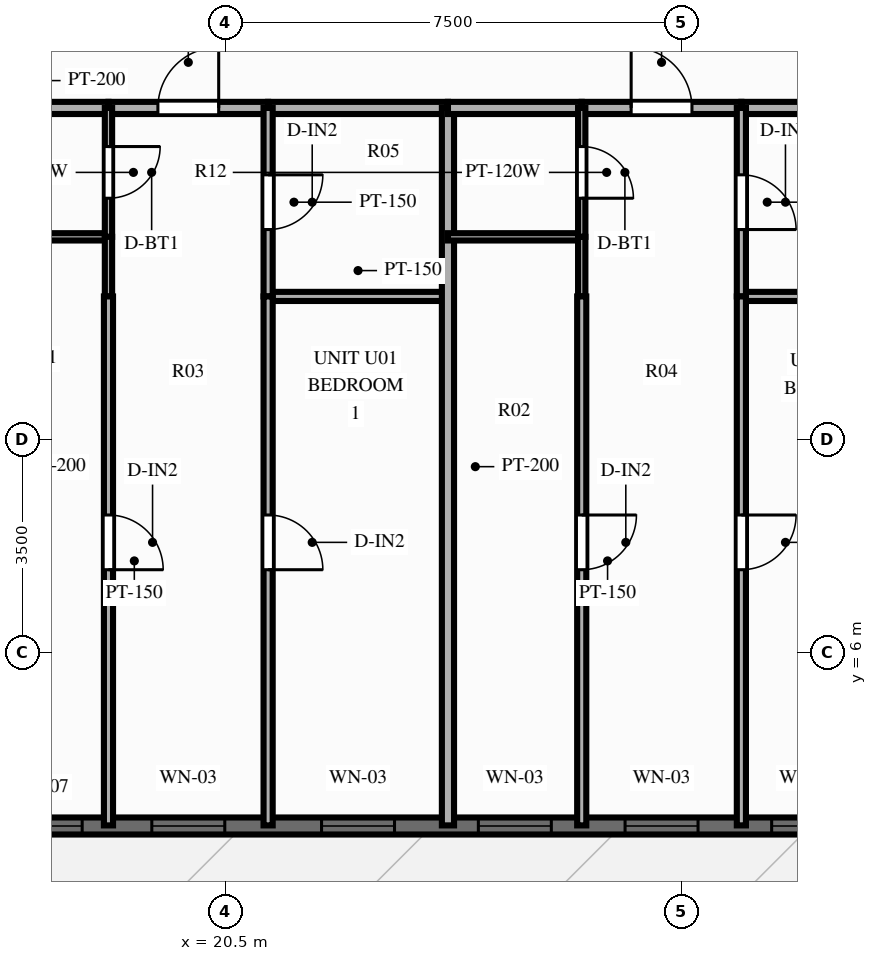
"""IFC4 building model, lengths in metres.
Left out: names, types, materials, properties, quantities, classifications, styles, units other than length and angle.
Written with IfcOpenShell. Run it as: python <this file> out.ifc"""

import sys

from ifc_helpers import new_model, si_unit, direction, frame, frame_2d, origin, place, context, subcontext, project, spatial, rectangle, extrude, source, transform, mapped, element, fill, save


model = new_model("IFC4")
c1 = context("Model", 3, precision=1e-05, world=origin(), true_north=direction((0.0, 1.0)))
c2 = subcontext(c1, "Body", "Model", "MODEL_VIEW")
j1 = project(units=[si_unit("LENGTHUNIT", "METRE"), si_unit("PLANEANGLEUNIT", "RADIAN")], contexts=[c1])
p1 = place(None, origin())
s1 = spatial("IfcSite", under=j1, at=p1, CompositionType="ELEMENT")
p2 = place(p1, origin())
s2 = spatial("IfcBuilding", under=s1, at=p2, CompositionType="ELEMENT")
p3 = place(p2, frame((0.0, 0.0, 77.85)))
s3 = spatial("IfcBuildingStorey", under=s2, at=p3, CompositionType="ELEMENT", Elevation=77.85)
p4 = place(p3, frame((16.2, 3.14, 0.0), z_axis=(0.0, 0.0, 1.0), x_axis=(1.0, 0.0, 0.0)))
e1 = element("IfcWall", 1, at=p4, inside=s3, PredefinedType="SOLIDWALL", context=c2, shape_type="SweptSolid", body=[
    extrude(rectangle(XDim=43.6, YDim=0.28, at=frame_2d((21.8, 0.0))), origin(), (0.0, 0.0, 1.0), 2.28),
])
p5 = place(p4, frame((0.748, 0.0, 0.25)))
e2 = element("IfcOpeningElement", 2, at=p5, cuts=e1, PredefinedType="OPENING", context=c2, shape_type="SweptSolid", body=[
    extrude(rectangle(XDim=1.2, YDim=1.5, at=frame_2d((0.6, 0.75))), frame((0.0, 0.152, 0.0), z_axis=(0.0, -1.0, 0.0), x_axis=(1.0, 0.0, 0.0)), (0.0, 0.0, 1.0), 0.304),
])
p6 = place(p4, frame((3.093, 0.0, 0.25)))
e3 = element("IfcOpeningElement", 3, at=p6, cuts=e1, PredefinedType="OPENING", context=c2, shape_type="SweptSolid", body=[
    extrude(rectangle(XDim=1.2, YDim=1.5, at=frame_2d((0.6, 0.75))), frame((0.0, 0.152, 0.0), z_axis=(0.0, -1.0, 0.0), x_axis=(1.0, 0.0, 0.0)), (0.0, 0.0, 1.0), 0.304),
])
p7 = place(p4, frame((5.885, 0.0, 0.25)))
e4 = element("IfcOpeningElement", 4, at=p7, cuts=e1, PredefinedType="OPENING", context=c2, shape_type="SweptSolid", body=[
    extrude(rectangle(XDim=1.2, YDim=1.5, at=frame_2d((0.6, 0.75))), frame((0.0, 0.152, 0.0), z_axis=(0.0, -1.0, 0.0), x_axis=(1.0, 0.0, 0.0)), (0.0, 0.0, 1.0), 0.304),
])
p8 = place(p4, frame((8.463, 0.0, 0.25)))
e5 = element("IfcOpeningElement", 5, at=p8, cuts=e1, PredefinedType="OPENING", context=c2, shape_type="SweptSolid", body=[
    extrude(rectangle(XDim=1.2, YDim=1.5, at=frame_2d((0.6, 0.75))), frame((0.0, 0.152, 0.0), z_axis=(0.0, -1.0, 0.0), x_axis=(1.0, 0.0, 0.0)), (0.0, 0.0, 1.0), 0.304),
])
p9 = place(p4, frame((10.876, 0.0, 0.25)))
e6 = element("IfcOpeningElement", 6, at=p9, cuts=e1, PredefinedType="OPENING", context=c2, shape_type="SweptSolid", body=[
    extrude(rectangle(XDim=1.2, YDim=1.5, at=frame_2d((0.6, 0.75))), frame((0.0, 0.152, 0.0), z_axis=(0.0, -1.0, 0.0), x_axis=(1.0, 0.0, 0.0)), (0.0, 0.0, 1.0), 0.304),
])
p10 = place(p4, frame((13.287, 0.0, 0.25)))
e7 = element("IfcOpeningElement", 7, at=p10, cuts=e1, PredefinedType="OPENING", context=c2, shape_type="SweptSolid", body=[
    extrude(rectangle(XDim=1.2, YDim=1.5, at=frame_2d((0.6, 0.75))), frame((0.0, 0.152, 0.0), z_axis=(0.0, -1.0, 0.0), x_axis=(1.0, 0.0, 0.0)), (0.0, 0.0, 1.0), 0.304),
])
p11 = place(p4, frame((16.521, 0.0, 0.25)))
e8 = element("IfcOpeningElement", 8, at=p11, cuts=e1, PredefinedType="OPENING", context=c2, shape_type="SweptSolid", body=[
    extrude(rectangle(XDim=1.2, YDim=1.5, at=frame_2d((0.6, 0.75))), frame((0.0, 0.152, 0.0), z_axis=(0.0, -1.0, 0.0), x_axis=(1.0, 0.0, 0.0)), (0.0, 0.0, 1.0), 0.304),
])
p12 = place(p4, frame((22.938, 0.0, 0.0), z_axis=(0.0, 0.0, 1.0), x_axis=(-1.0, 0.0, 0.0)))
e9 = element("IfcOpeningElement", 9, at=p12, cuts=e1, PredefinedType="OPENING", context=c2, shape_type="SweptSolid", body=[
    extrude(rectangle(XDim=1.1, YDim=2.15, at=frame_2d((0.55, 1.075))), frame((0.0, 0.152, 0.0), z_axis=(0.0, -1.0, 0.0), x_axis=(1.0, 0.0, 0.0)), (0.0, 0.0, 1.0), 0.304),
])
p13 = place(p4, frame((26.657, 0.0, 0.25)))
e10 = element("IfcOpeningElement", 10, at=p13, cuts=e1, PredefinedType="OPENING", context=c2, shape_type="SweptSolid", body=[
    extrude(rectangle(XDim=0.95, YDim=1.5, at=frame_2d((0.475, 0.75))), frame((0.0, 0.152, 0.0), z_axis=(0.0, -1.0, 0.0), x_axis=(1.0, 0.0, 0.0)), (0.0, 0.0, 1.0), 0.304),
])
p14 = place(p4, frame((28.965, 0.0, 0.25)))
e11 = element("IfcOpeningElement", 11, at=p14, cuts=e1, PredefinedType="OPENING", context=c2, shape_type="SweptSolid", body=[
    extrude(rectangle(XDim=0.7, YDim=1.5, at=frame_2d((0.35, 0.75))), frame((0.0, 0.152, 0.0), z_axis=(0.0, -1.0, 0.0), x_axis=(1.0, 0.0, 0.0)), (0.0, 0.0, 1.0), 0.304),
])
p15 = place(p4, frame((31.158, 0.0, 0.25)))
e12 = element("IfcOpeningElement", 12, at=p15, cuts=e1, PredefinedType="OPENING", context=c2, shape_type="SweptSolid", body=[
    extrude(rectangle(XDim=1.2, YDim=1.5, at=frame_2d((0.6, 0.75))), frame((0.0, 0.152, 0.0), z_axis=(0.0, -1.0, 0.0), x_axis=(1.0, 0.0, 0.0)), (0.0, 0.0, 1.0), 0.304),
])
p16 = place(p4, frame((35.992, 0.0, 0.25)))
e13 = element("IfcOpeningElement", 13, at=p16, cuts=e1, PredefinedType="OPENING", context=c2, shape_type="SweptSolid", body=[
    extrude(rectangle(XDim=1.2, YDim=1.5, at=frame_2d((0.6, 0.75))), frame((0.0, 0.152, 0.0), z_axis=(0.0, -1.0, 0.0), x_axis=(1.0, 0.0, 0.0)), (0.0, 0.0, 1.0), 0.304),
])
p17 = place(p4, frame((40.885, 0.0, 0.25)))
e14 = element("IfcOpeningElement", 14, at=p17, cuts=e1, PredefinedType="OPENING", context=c2, shape_type="SweptSolid", body=[
    extrude(rectangle(XDim=1.2, YDim=1.5, at=frame_2d((0.6, 0.75))), frame((0.0, 0.152, 0.0), z_axis=(0.0, -1.0, 0.0), x_axis=(1.0, 0.0, 0.0)), (0.0, 0.0, 1.0), 0.304),
])
p18 = place(p3, frame((16.38, 14.95, 0.0), z_axis=(0.0, 0.0, 1.0), x_axis=(1.0, 0.0, 0.0)))
e15 = element("IfcWall", 15, at=p18, inside=s3, PredefinedType="PARTITIONING", context=c2, shape_type="SweptSolid", body=[
    extrude(rectangle(XDim=2.2, YDim=0.2, at=frame_2d((1.1, 0.0))), origin(), (0.0, 0.0, 1.0), 2.79),
])
p19 = place(p3, frame((18.58, 14.95, 0.0), z_axis=(0.0, 0.0, 1.0), x_axis=(1.0, 0.0, 0.0)))
e16 = element("IfcWall", 16, at=p19, inside=s3, PredefinedType="PARTITIONING", context=c2, shape_type="SweptSolid", body=[
    extrude(rectangle(XDim=2.625, YDim=0.2, at=frame_2d((1.313, 0.0))), origin(), (0.0, 0.0, 1.0), 2.79),
])
p20 = place(p19, frame((0.813, 0.0, 0.0)))
e17 = element("IfcOpeningElement", 17, at=p20, cuts=e16, PredefinedType="OPENING", context=c2, shape_type="SweptSolid", body=[
    extrude(rectangle(XDim=1.0, YDim=2.15, at=frame_2d((0.5, 1.075))), frame((0.0, 0.112, 0.0), z_axis=(0.0, -1.0, 0.0), x_axis=(1.0, 0.0, 0.0)), (0.0, 0.0, 1.0), 0.224),
])
p21 = place(p3, frame((21.206, 14.95, 0.0), z_axis=(0.0, 0.0, 1.0), x_axis=(1.0, 0.0, 0.0)))
e18 = element("IfcWall", 18, at=p21, inside=s3, PredefinedType="PARTITIONING", context=c2, shape_type="SweptSolid", body=[
    extrude(rectangle(XDim=2.958, YDim=0.2, at=frame_2d((1.479, 0.0))), origin(), (0.0, 0.0, 1.0), 2.79),
])
p22 = place(p3, frame((16.38, 12.83, 0.0), z_axis=(0.0, 0.0, 1.0), x_axis=(1.0, 0.0, 0.0)))
e19 = element("IfcWall", 19, at=p22, inside=s3, PredefinedType="PARTITIONING", context=c2, shape_type="SweptSolid", body=[
    extrude(rectangle(XDim=2.2, YDim=0.12, at=frame_2d((1.1, 0.0))), origin(), (0.0, 0.0, 1.0), 2.79),
])
p23 = place(p3, frame((21.206, 11.85, 0.0), z_axis=(0.0, 0.0, 1.0), x_axis=(1.0, 0.0, 0.0)))
e20 = element("IfcWall", 20, at=p23, inside=s3, PredefinedType="PARTITIONING", context=c2, shape_type="SweptSolid", body=[
    extrude(rectangle(XDim=2.958, YDim=0.15, at=frame_2d((1.479, 0.0))), origin(), (0.0, 0.0, 1.0), 2.79),
])
p24 = place(p3, frame((18.58, 14.95, 0.0), z_axis=(0.0, 0.0, 1.0), x_axis=(0.0, -1.0, 0.0)))
e21 = element("IfcWall", 21, at=p24, inside=s3, PredefinedType="PARTITIONING", context=c2, shape_type="SweptSolid", body=[
    extrude(rectangle(XDim=2.12, YDim=0.12, at=frame_2d((1.06, 0.0))), origin(), (0.0, 0.0, 1.0), 2.79),
])
p25 = place(p24, frame((0.635, 0.0, 0.0)))
e22 = element("IfcOpeningElement", 22, at=p25, cuts=e21, PredefinedType="OPENING", context=c2, shape_type="SweptSolid", body=[
    extrude(rectangle(XDim=0.85, YDim=2.05, at=frame_2d((0.425, 1.025))), frame((0.0, 0.072, 0.0), z_axis=(0.0, -1.0, 0.0), x_axis=(1.0, 0.0, 0.0)), (0.0, 0.0, 1.0), 0.144),
])
p26 = place(p3, frame((18.58, 12.83, 0.0), z_axis=(0.0, 0.0, 1.0), x_axis=(0.0, -1.0, 0.0)))
e23 = element("IfcWall", 23, at=p26, inside=s3, PredefinedType="PARTITIONING", context=c2, shape_type="SweptSolid", body=[
    extrude(rectangle(XDim=0.98, YDim=0.12, at=frame_2d((0.49, 0.0))), origin(), (0.0, 0.0, 1.0), 2.79),
])
p27 = place(p3, frame((18.58, 11.85, 0.0), z_axis=(0.0, 0.0, 1.0), x_axis=(0.0, -1.0, 0.0)))
e24 = element("IfcWall", 24, at=p27, inside=s3, PredefinedType="PARTITIONING", context=c2, shape_type="SweptSolid", body=[
    extrude(rectangle(XDim=8.7, YDim=0.15, at=frame_2d((4.35, 0.0))), origin(), (0.0, 0.0, 1.0), 2.79),
])
p28 = place(p27, frame((3.595, 0.0, 0.0)))
e25 = element("IfcOpeningElement", 25, at=p28, cuts=e24, PredefinedType="OPENING", context=c2, shape_type="SweptSolid", body=[
    extrude(rectangle(XDim=0.9, YDim=2.1, at=frame_2d((0.45, 1.05))), frame((0.0, 0.087, 0.0), z_axis=(0.0, -1.0, 0.0), x_axis=(1.0, 0.0, 0.0)), (0.0, 0.0, 1.0), 0.174),
])
p29 = place(p3, frame((21.206, 14.95, 0.0), z_axis=(0.0, 0.0, 1.0), x_axis=(0.0, -1.0, 0.0)))
e26 = element("IfcWall", 26, at=p29, inside=s3, PredefinedType="PARTITIONING", context=c2, shape_type="SweptSolid", body=[
    extrude(rectangle(XDim=3.1, YDim=0.15, at=frame_2d((1.55, 0.0))), origin(), (0.0, 0.0, 1.0), 2.79),
])
p30 = place(p29, frame((1.1, 0.0, 0.0)))
e27 = element("IfcOpeningElement", 27, at=p30, cuts=e26, PredefinedType="OPENING", context=c2, shape_type="SweptSolid", body=[
    extrude(rectangle(XDim=0.9, YDim=2.1, at=frame_2d((0.45, 1.05))), frame((0.0, 0.087, 0.0), z_axis=(0.0, -1.0, 0.0), x_axis=(1.0, 0.0, 0.0)), (0.0, 0.0, 1.0), 0.174),
])
p31 = place(p3, frame((21.206, 11.85, 0.0), z_axis=(0.0, 0.0, 1.0), x_axis=(0.0, -1.0, 0.0)))
e28 = element("IfcWall", 28, at=p31, inside=s3, PredefinedType="PARTITIONING", context=c2, shape_type="SweptSolid", body=[
    extrude(rectangle(XDim=8.7, YDim=0.15, at=frame_2d((4.35, 0.0))), origin(), (0.0, 0.0, 1.0), 2.79),
])
p32 = place(p31, frame((3.595, 0.0, 0.0)))
e29 = element("IfcOpeningElement", 29, at=p32, cuts=e28, PredefinedType="OPENING", context=c2, shape_type="SweptSolid", body=[
    extrude(rectangle(XDim=0.9, YDim=2.1, at=frame_2d((0.45, 1.05))), frame((0.0, 0.087, 0.0), z_axis=(0.0, -1.0, 0.0), x_axis=(1.0, 0.0, 0.0)), (0.0, 0.0, 1.0), 0.174),
])
p33 = place(p3, frame((24.163, 14.95, 0.0), z_axis=(0.0, 0.0, 1.0), x_axis=(0.0, -1.0, 0.0)))
e30 = element("IfcWall", 30, at=p33, inside=s3, PredefinedType="PARTITIONING", context=c2, shape_type="SweptSolid", body=[
    extrude(rectangle(XDim=11.8, YDim=0.2, at=frame_2d((5.9, 0.0))), origin(), (0.0, 0.0, 1.0), 2.79),
])
p34 = place(p3, frame((24.163, 14.95, 0.0), z_axis=(0.0, 0.0, 1.0), x_axis=(1.0, 0.0, 0.0)))
e31 = element("IfcWall", 31, at=p34, inside=s3, PredefinedType="PARTITIONING", context=c2, shape_type="SweptSolid", body=[
    extrude(rectangle(XDim=2.2, YDim=0.2, at=frame_2d((1.1, 0.0))), origin(), (0.0, 0.0, 1.0), 2.79),
])
p35 = place(p3, frame((26.363, 14.95, 0.0), z_axis=(0.0, 0.0, 1.0), x_axis=(1.0, 0.0, 0.0)))
e32 = element("IfcWall", 32, at=p35, inside=s3, PredefinedType="PARTITIONING", context=c2, shape_type="SweptSolid", body=[
    extrude(rectangle(XDim=2.625, YDim=0.2, at=frame_2d((1.313, 0.0))), origin(), (0.0, 0.0, 1.0), 2.79),
])
p36 = place(p35, frame((0.813, 0.0, 0.0)))
e33 = element("IfcOpeningElement", 33, at=p36, cuts=e32, PredefinedType="OPENING", context=c2, shape_type="SweptSolid", body=[
    extrude(rectangle(XDim=1.0, YDim=2.15, at=frame_2d((0.5, 1.075))), frame((0.0, 0.112, 0.0), z_axis=(0.0, -1.0, 0.0), x_axis=(1.0, 0.0, 0.0)), (0.0, 0.0, 1.0), 0.224),
])
p37 = place(p3, frame((28.989, 14.95, 0.0), z_axis=(0.0, 0.0, 1.0), x_axis=(1.0, 0.0, 0.0)))
e34 = element("IfcWall", 34, at=p37, inside=s3, PredefinedType="PARTITIONING", context=c2, shape_type="SweptSolid", body=[
    extrude(rectangle(XDim=2.958, YDim=0.2, at=frame_2d((1.479, 0.0))), origin(), (0.0, 0.0, 1.0), 2.79),
])
p38 = place(p3, frame((24.163, 12.83, 0.0), z_axis=(0.0, 0.0, 1.0), x_axis=(1.0, 0.0, 0.0)))
e35 = element("IfcWall", 35, at=p38, inside=s3, PredefinedType="PARTITIONING", context=c2, shape_type="SweptSolid", body=[
    extrude(rectangle(XDim=2.2, YDim=0.12, at=frame_2d((1.1, 0.0))), origin(), (0.0, 0.0, 1.0), 2.79),
])
p39 = place(p3, frame((28.989, 11.85, 0.0), z_axis=(0.0, 0.0, 1.0), x_axis=(1.0, 0.0, 0.0)))
e36 = element("IfcWall", 36, at=p39, inside=s3, PredefinedType="PARTITIONING", context=c2, shape_type="SweptSolid", body=[
    extrude(rectangle(XDim=2.958, YDim=0.15, at=frame_2d((1.479, 0.0))), origin(), (0.0, 0.0, 1.0), 2.79),
])
p40 = place(p3, frame((26.363, 14.95, 0.0), z_axis=(0.0, 0.0, 1.0), x_axis=(0.0, -1.0, 0.0)))
e37 = element("IfcWall", 37, at=p40, inside=s3, PredefinedType="PARTITIONING", context=c2, shape_type="SweptSolid", body=[
    extrude(rectangle(XDim=2.12, YDim=0.12, at=frame_2d((1.06, 0.0))), origin(), (0.0, 0.0, 1.0), 2.79),
])
p41 = place(p40, frame((0.635, 0.0, 0.0)))
e38 = element("IfcOpeningElement", 38, at=p41, cuts=e37, PredefinedType="OPENING", context=c2, shape_type="SweptSolid", body=[
    extrude(rectangle(XDim=0.85, YDim=2.05, at=frame_2d((0.425, 1.025))), frame((0.0, 0.072, 0.0), z_axis=(0.0, -1.0, 0.0), x_axis=(1.0, 0.0, 0.0)), (0.0, 0.0, 1.0), 0.144),
])
p42 = place(p3, frame((26.363, 12.83, 0.0), z_axis=(0.0, 0.0, 1.0), x_axis=(0.0, -1.0, 0.0)))
e39 = element("IfcWall", 39, at=p42, inside=s3, PredefinedType="PARTITIONING", context=c2, shape_type="SweptSolid", body=[
    extrude(rectangle(XDim=0.98, YDim=0.12, at=frame_2d((0.49, 0.0))), origin(), (0.0, 0.0, 1.0), 2.79),
])
p43 = place(p3, frame((26.363, 11.85, 0.0), z_axis=(0.0, 0.0, 1.0), x_axis=(0.0, -1.0, 0.0)))
e40 = element("IfcWall", 40, at=p43, inside=s3, PredefinedType="PARTITIONING", context=c2, shape_type="SweptSolid", body=[
    extrude(rectangle(XDim=8.7, YDim=0.15, at=frame_2d((4.35, 0.0))), origin(), (0.0, 0.0, 1.0), 2.79),
])
p44 = place(p43, frame((3.595, 0.0, 0.0)))
e41 = element("IfcOpeningElement", 41, at=p44, cuts=e40, PredefinedType="OPENING", context=c2, shape_type="SweptSolid", body=[
    extrude(rectangle(XDim=0.9, YDim=2.1, at=frame_2d((0.45, 1.05))), frame((0.0, 0.087, 0.0), z_axis=(0.0, -1.0, 0.0), x_axis=(1.0, 0.0, 0.0)), (0.0, 0.0, 1.0), 0.174),
])
p45 = place(p3, frame((28.989, 14.95, 0.0), z_axis=(0.0, 0.0, 1.0), x_axis=(0.0, -1.0, 0.0)))
e42 = element("IfcWall", 42, at=p45, inside=s3, PredefinedType="PARTITIONING", context=c2, shape_type="SweptSolid", body=[
    extrude(rectangle(XDim=3.1, YDim=0.15, at=frame_2d((1.55, 0.0))), origin(), (0.0, 0.0, 1.0), 2.79),
])
p46 = place(p45, frame((1.1, 0.0, 0.0)))
e43 = element("IfcOpeningElement", 43, at=p46, cuts=e42, PredefinedType="OPENING", context=c2, shape_type="SweptSolid", body=[
    extrude(rectangle(XDim=0.9, YDim=2.1, at=frame_2d((0.45, 1.05))), frame((0.0, 0.087, 0.0), z_axis=(0.0, -1.0, 0.0), x_axis=(1.0, 0.0, 0.0)), (0.0, 0.0, 1.0), 0.174),
])
p47 = place(p3, frame((28.989, 11.85, 0.0), z_axis=(0.0, 0.0, 1.0), x_axis=(0.0, -1.0, 0.0)))
e44 = element("IfcWall", 44, at=p47, inside=s3, PredefinedType="PARTITIONING", context=c2, shape_type="SweptSolid", body=[
    extrude(rectangle(XDim=8.7, YDim=0.15, at=frame_2d((4.35, 0.0))), origin(), (0.0, 0.0, 1.0), 2.79),
])
p48 = place(p47, frame((3.595, 0.0, 0.0)))
e45 = element("IfcOpeningElement", 45, at=p48, cuts=e44, PredefinedType="OPENING", context=c2, shape_type="SweptSolid", body=[
    extrude(rectangle(XDim=0.9, YDim=2.1, at=frame_2d((0.45, 1.05))), frame((0.0, 0.087, 0.0), z_axis=(0.0, -1.0, 0.0), x_axis=(1.0, 0.0, 0.0)), (0.0, 0.0, 1.0), 0.174),
])
m1 = source(origin(), c2, "Body", "SweptSolid", [
    extrude(rectangle(XDim=1.2, YDim=1.5, at=frame_2d((0.6, 0.75))), frame((0.0, 0.03, 0.0), z_axis=(0.0, -1.0, 0.0), x_axis=(1.0, 0.0, 0.0)), (0.0, 0.0, 1.0), 0.06),
])
p49 = place(p5, origin())
e46 = element("IfcWindow", 46, at=p49, inside=s3, PartitioningType="SINGLE_PANEL", PredefinedType="WINDOW", context=c2, shape_type="MappedRepresentation", body=[
    mapped(m1, transform((0.0, 0.0, 0.0), scale=1.0)),
])
fill(e2, e46)
p50 = place(p6, origin())
e47 = element("IfcWindow", 47, at=p50, inside=s3, PartitioningType="SINGLE_PANEL", PredefinedType="WINDOW", context=c2, shape_type="MappedRepresentation", body=[
    mapped(m1, transform((0.0, 0.0, 0.0), scale=1.0)),
])
fill(e3, e47)
p51 = place(p7, origin())
e48 = element("IfcWindow", 48, at=p51, inside=s3, PartitioningType="SINGLE_PANEL", PredefinedType="WINDOW", context=c2, shape_type="MappedRepresentation", body=[
    mapped(m1, transform((0.0, 0.0, 0.0), scale=1.0)),
])
fill(e4, e48)
p52 = place(p8, origin())
e49 = element("IfcWindow", 49, at=p52, inside=s3, PartitioningType="SINGLE_PANEL", PredefinedType="WINDOW", context=c2, shape_type="MappedRepresentation", body=[
    mapped(m1, transform((0.0, 0.0, 0.0), scale=1.0)),
])
fill(e5, e49)
p53 = place(p9, origin())
e50 = element("IfcWindow", 50, at=p53, inside=s3, PartitioningType="SINGLE_PANEL", PredefinedType="WINDOW", context=c2, shape_type="MappedRepresentation", body=[
    mapped(m1, transform((0.0, 0.0, 0.0), scale=1.0)),
])
fill(e6, e50)
p54 = place(p10, origin())
e51 = element("IfcWindow", 51, at=p54, inside=s3, PartitioningType="SINGLE_PANEL", PredefinedType="WINDOW", context=c2, shape_type="MappedRepresentation", body=[
    mapped(m1, transform((0.0, 0.0, 0.0), scale=1.0)),
])
fill(e7, e51)
m2 = source(origin(), c2, "Body", "SweptSolid", [
    extrude(rectangle(XDim=1.0, YDim=2.15, at=frame_2d((0.5, 1.075))), frame((0.0, 0.025, 0.0), z_axis=(0.0, -1.0, 0.0), x_axis=(1.0, 0.0, 0.0)), (0.0, 0.0, 1.0), 0.05),
])
p55 = place(p20, origin())
e52 = element("IfcDoor", 52, at=p55, inside=s3, OperationType="SINGLE_SWING_RIGHT", PredefinedType="DOOR", context=c2, shape_type="MappedRepresentation", body=[
    mapped(m2, transform((0.0, 0.0, 0.0), scale=1.0)),
])
fill(e17, e52)
m3 = source(origin(), c2, "Body", "SweptSolid", [
    extrude(rectangle(XDim=0.85, YDim=2.05, at=frame_2d((0.425, 1.025))), frame((0.0, 0.025, 0.0), z_axis=(0.0, -1.0, 0.0), x_axis=(1.0, 0.0, 0.0)), (0.0, 0.0, 1.0), 0.05),
])
p56 = place(p25, origin())
e53 = element("IfcDoor", 53, at=p56, inside=s3, OperationType="SINGLE_SWING_LEFT", PredefinedType="DOOR", context=c2, shape_type="MappedRepresentation", body=[
    mapped(m3, transform((0.0, 0.0, 0.0), scale=1.0)),
])
fill(e22, e53)
m4 = source(origin(), c2, "Body", "SweptSolid", [
    extrude(rectangle(XDim=0.9, YDim=2.1, at=frame_2d((0.45, 1.05))), frame((0.0, 0.025, 0.0), z_axis=(0.0, -1.0, 0.0), x_axis=(1.0, 0.0, 0.0)), (0.0, 0.0, 1.0), 0.05),
])
p57 = place(p28, origin())
e54 = element("IfcDoor", 54, at=p57, inside=s3, OperationType="SINGLE_SWING_RIGHT", PredefinedType="DOOR", context=c2, shape_type="MappedRepresentation", body=[
    mapped(m4, transform((0.0, 0.0, 0.0), scale=1.0)),
])
fill(e25, e54)
p58 = place(p30, origin())
e55 = element("IfcDoor", 55, at=p58, inside=s3, OperationType="SINGLE_SWING_LEFT", PredefinedType="DOOR", context=c2, shape_type="MappedRepresentation", body=[
    mapped(m4, transform((0.0, 0.0, 0.0), scale=1.0)),
])
fill(e27, e55)
p59 = place(p32, origin())
e56 = element("IfcDoor", 56, at=p59, inside=s3, OperationType="SINGLE_SWING_RIGHT", PredefinedType="DOOR", context=c2, shape_type="MappedRepresentation", body=[
    mapped(m4, transform((0.0, 0.0, 0.0), scale=1.0)),
])
fill(e29, e56)
p60 = place(p36, origin())
e57 = element("IfcDoor", 57, at=p60, inside=s3, OperationType="SINGLE_SWING_LEFT", PredefinedType="DOOR", context=c2, shape_type="MappedRepresentation", body=[
    mapped(m2, transform((0.0, 0.0, 0.0), scale=1.0)),
])
fill(e33, e57)
p61 = place(p41, origin())
e58 = element("IfcDoor", 58, at=p61, inside=s3, OperationType="SINGLE_SWING_RIGHT", PredefinedType="DOOR", context=c2, shape_type="MappedRepresentation", body=[
    mapped(m3, transform((0.0, 0.0, 0.0), scale=1.0)),
])
fill(e38, e58)
p62 = place(p44, origin())
e59 = element("IfcDoor", 59, at=p62, inside=s3, OperationType="SINGLE_SWING_LEFT", PredefinedType="DOOR", context=c2, shape_type="MappedRepresentation", body=[
    mapped(m4, transform((0.0, 0.0, 0.0), scale=1.0)),
])
fill(e41, e59)
p63 = place(p46, origin())
e60 = element("IfcDoor", 60, at=p63, inside=s3, OperationType="SINGLE_SWING_RIGHT", PredefinedType="DOOR", context=c2, shape_type="MappedRepresentation", body=[
    mapped(m4, transform((0.0, 0.0, 0.0), scale=1.0)),
])
fill(e43, e60)
p64 = place(p48, origin())
e61 = element("IfcDoor", 61, at=p64, inside=s3, OperationType="SINGLE_SWING_LEFT", PredefinedType="DOOR", context=c2, shape_type="MappedRepresentation", body=[
    mapped(m4, transform((0.0, 0.0, 0.0), scale=1.0)),
])
fill(e45, e61)
save(model, sys.argv[1])
